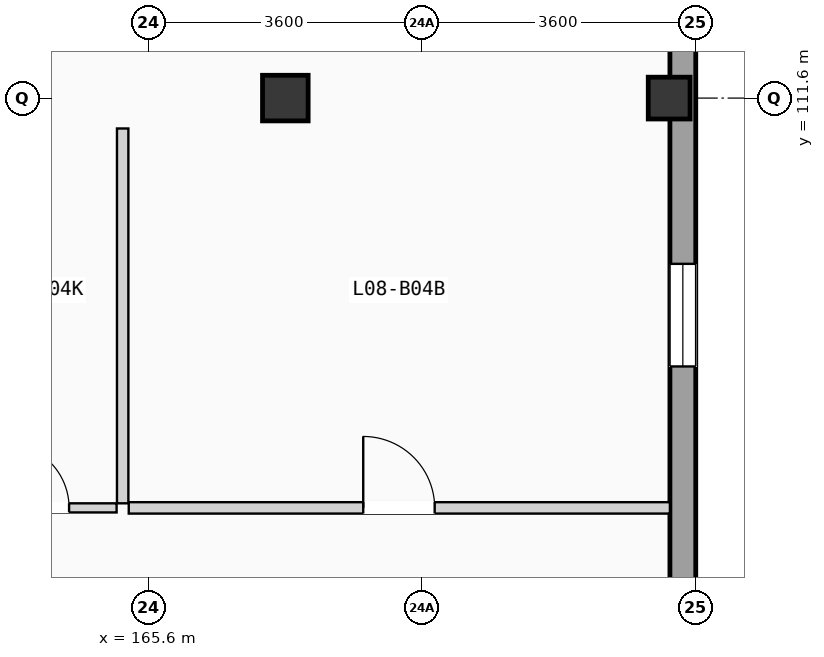
"""IFC4 building model, lengths in metres.
Left out: names, types, materials, properties, quantities, classifications, styles, units other than length and angle.
Written with IfcOpenShell. Run it as: python <this file> out.ifc"""

import sys

from ifc_helpers import new_model, si_unit, direction, frame, frame_2d, origin, origin_2d, place, context, subcontext, project, spatial, rectangle, extrude, element, fill, save


model = new_model("IFC4")
c1 = context("Model", 3, precision=1e-05, world=origin(), true_north=direction((0.0, 1.0)))
c2 = subcontext(c1, "Body", "Model", "MODEL_VIEW")
j1 = project(units=[si_unit("LENGTHUNIT", "METRE"), si_unit("PLANEANGLEUNIT", "RADIAN")], contexts=[c1])
p1 = place(None, origin())
s1 = spatial("IfcSite", under=j1, at=p1, CompositionType="ELEMENT")
p2 = place(p1, origin())
s2 = spatial("IfcBuilding", under=s1, at=p2, CompositionType="ELEMENT")
p3 = place(p2, frame((0.0, 0.0, 27.825)))
s3 = spatial("IfcBuildingStorey", under=s2, at=p3, CompositionType="ELEMENT", Elevation=27.825)
p4 = place(p3, frame((167.4, 111.6, 0.0), z_axis=(0.0, 0.0, 1.0), x_axis=(1.0, 0.0, 0.0)))
e1 = element("IfcColumn", 1, at=p4, inside=s3, PredefinedType="COLUMN", context=c2, shape_type="SweptSolid", body=[
    extrude(rectangle(XDim=0.6, YDim=0.6, at=origin_2d()), origin(), (0.0, 0.0, 1.0), 3.15),
])
p5 = place(p3, frame((172.45, 111.6, 0.0), z_axis=(0.0, 0.0, 1.0), x_axis=(1.0, 0.0, 0.0)))
e2 = element("IfcColumn", 2, at=p5, inside=s3, PredefinedType="COLUMN", context=c2, shape_type="SweptSolid", body=[
    extrude(rectangle(XDim=0.55, YDim=0.55, at=origin_2d()), origin(), (0.0, 0.0, 1.0), 3.15),
])
p6 = place(p3, frame((172.63, 68.74, 0.0), z_axis=(0.0, 0.0, 1.0), x_axis=(0.0, 1.0, 0.0)))
e3 = element("IfcWall", 3, at=p6, inside=s3, PredefinedType="SOLIDWALL", context=c2, shape_type="SweptSolid", body=[
    extrude(rectangle(XDim=49.72, YDim=0.34, at=frame_2d((24.86, 0.0))), origin(), (0.0, 0.0, 1.0), 2.89),
])
p7 = place(p6, frame((16.657, 0.0, 0.705)))
e4 = element("IfcOpeningElement", 4, at=p7, cuts=e3, PredefinedType="OPENING", context=c2, shape_type="SweptSolid", body=[
    extrude(rectangle(XDim=1.25, YDim=1.5, at=frame_2d((0.625, 0.75))), frame((0.0, 0.18, 0.0), z_axis=(0.0, -1.0, 0.0), x_axis=(1.0, 0.0, 0.0)), (0.0, 0.0, 1.0), 0.36),
])
p8 = place(p6, frame((9.528, 0.0, 0.555)))
e5 = element("IfcOpeningElement", 5, at=p8, cuts=e3, PredefinedType="OPENING", context=c2, shape_type="SweptSolid", body=[
    extrude(rectangle(XDim=1.25, YDim=1.65, at=frame_2d((0.625, 0.825))), frame((0.0, 0.18, 0.0), z_axis=(0.0, -1.0, 0.0), x_axis=(1.0, 0.0, 0.0)), (0.0, 0.0, 1.0), 0.36),
])
p9 = place(p6, frame((23.379, 0.0, 0.85)))
e6 = element("IfcOpeningElement", 6, at=p9, cuts=e3, PredefinedType="OPENING", context=c2, shape_type="SweptSolid", body=[
    extrude(rectangle(XDim=0.95, YDim=1.2, at=frame_2d((0.475, 0.6))), frame((0.0, 0.18, 0.0), z_axis=(0.0, -1.0, 0.0), x_axis=(1.0, 0.0, 0.0)), (0.0, 0.0, 1.0), 0.36),
])
p10 = place(p6, frame((32.735, 0.0, 0.9)))
e7 = element("IfcOpeningElement", 7, at=p10, cuts=e3, PredefinedType="OPENING", context=c2, shape_type="SweptSolid", body=[
    extrude(rectangle(XDim=1.35, YDim=1.2, at=frame_2d((0.675, 0.6))), frame((0.0, 0.18, 0.0), z_axis=(0.0, -1.0, 0.0), x_axis=(1.0, 0.0, 0.0)), (0.0, 0.0, 1.0), 0.36),
])
p11 = place(p6, frame((29.325, 0.0, 0.855)))
e8 = element("IfcOpeningElement", 8, at=p11, cuts=e3, PredefinedType="OPENING", context=c2, shape_type="SweptSolid", body=[
    extrude(rectangle(XDim=1.35, YDim=1.35, at=frame_2d((0.675, 0.675))), frame((0.0, 0.18, 0.0), z_axis=(0.0, -1.0, 0.0), x_axis=(1.0, 0.0, 0.0)), (0.0, 0.0, 1.0), 0.36),
])
p12 = place(p6, frame((39.329, 0.0, 0.705)))
e9 = element("IfcOpeningElement", 9, at=p12, cuts=e3, PredefinedType="OPENING", context=c2, shape_type="SweptSolid", body=[
    extrude(rectangle(XDim=1.35, YDim=1.5, at=frame_2d((0.675, 0.75))), frame((0.0, 0.18, 0.0), z_axis=(0.0, -1.0, 0.0), x_axis=(1.0, 0.0, 0.0)), (0.0, 0.0, 1.0), 0.36),
])
p13 = place(p3, frame((163.073, 106.208, 0.0), z_axis=(0.0, 0.0, 1.0), x_axis=(1.0, 0.0, 0.0)))
e10 = element("IfcWall", 10, at=p13, inside=s3, PredefinedType="PARTITIONING", context=c2, shape_type="SweptSolid", body=[
    extrude(rectangle(XDim=2.107, YDim=0.12, at=frame_2d((1.053, 0.0))), origin(), (0.0, 0.0, 1.0), 2.87),
])
p14 = place(p13, frame((0.632, 0.0, 0.0)))
e11 = element("IfcOpeningElement", 11, at=p14, cuts=e10, PredefinedType="OPENING", context=c2, shape_type="SweptSolid", body=[
    extrude(rectangle(XDim=0.85, YDim=2.01, at=frame_2d((0.425, 1.005))), frame((0.0, 0.07, 0.0), z_axis=(0.0, -1.0, 0.0), x_axis=(1.0, 0.0, 0.0)), (0.0, 0.0, 1.0), 0.14),
])
p15 = place(p3, frame((165.34, 106.208, 0.0), z_axis=(0.0, 0.0, 1.0), x_axis=(1.0, 0.0, 0.0)))
e12 = element("IfcWall", 12, at=p15, inside=s3, PredefinedType="PARTITIONING", context=c2, shape_type="SweptSolid", body=[
    extrude(rectangle(XDim=7.12, YDim=0.15, at=frame_2d((3.56, 0.0))), origin(), (0.0, 0.0, 1.0), 2.87),
])
p16 = place(p15, frame((3.085, 0.0, 0.0)))
e13 = element("IfcOpeningElement", 13, at=p16, cuts=e12, PredefinedType="OPENING", context=c2, shape_type="SweptSolid", body=[
    extrude(rectangle(XDim=0.94, YDim=2.06, at=frame_2d((0.47, 1.03))), frame((0.0, 0.085, 0.0), z_axis=(0.0, -1.0, 0.0), x_axis=(1.0, 0.0, 0.0)), (0.0, 0.0, 1.0), 0.17),
])
p17 = place(p3, frame((165.26, 106.268, 0.0), z_axis=(0.0, 0.0, 1.0), x_axis=(0.0, 1.0, 0.0)))
e14 = element("IfcWall", 14, at=p17, inside=s3, PredefinedType="PARTITIONING", context=c2, shape_type="SweptSolid", body=[
    extrude(rectangle(XDim=4.932, YDim=0.15, at=frame_2d((2.466, 0.0))), origin(), (0.0, 0.0, 1.0), 2.87),
])
p18 = place(p12, origin())
e15 = element("IfcWindow", 15, at=p18, inside=s3, PartitioningType="SINGLE_PANEL", PredefinedType="WINDOW", context=c2, shape_type="SweptSolid", body=[
    extrude(rectangle(XDim=1.35, YDim=1.5, at=frame_2d((0.675, 0.75))), frame((0.0, 0.03, 0.0), z_axis=(0.0, -1.0, 0.0), x_axis=(1.0, 0.0, 0.0)), (0.0, 0.0, 1.0), 0.06),
])
fill(e9, e15)
p19 = place(p14, origin())
e16 = element("IfcDoor", 16, at=p19, inside=s3, OperationType="SINGLE_SWING_LEFT", PredefinedType="DOOR", context=c2, shape_type="SweptSolid", body=[
    extrude(rectangle(XDim=0.85, YDim=2.01, at=frame_2d((0.425, 1.005))), frame((0.0, 0.025, 0.0), z_axis=(0.0, -1.0, 0.0), x_axis=(1.0, 0.0, 0.0)), (0.0, 0.0, 1.0), 0.05),
])
fill(e11, e16)
p20 = place(p16, origin())
e17 = element("IfcDoor", 17, at=p20, inside=s3, OperationType="SINGLE_SWING_LEFT", PredefinedType="DOOR", context=c2, shape_type="SweptSolid", body=[
    extrude(rectangle(XDim=0.94, YDim=2.06, at=frame_2d((0.47, 1.03))), frame((0.0, 0.025, 0.0), z_axis=(0.0, -1.0, 0.0), x_axis=(1.0, 0.0, 0.0)), (0.0, 0.0, 1.0), 0.05),
])
fill(e13, e17)
save(model, sys.argv[1])
